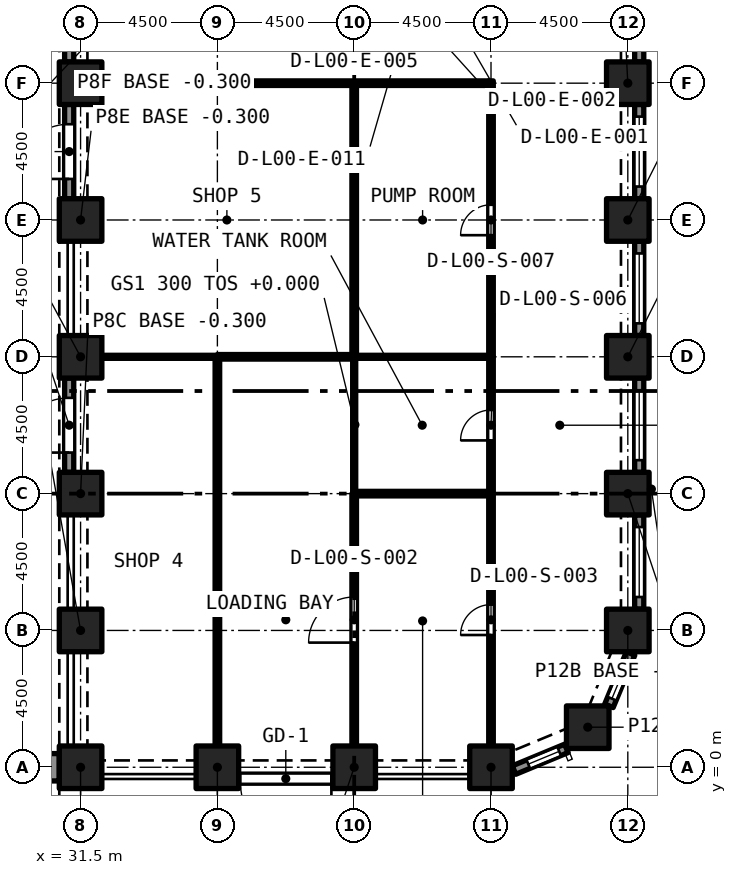
"""IFC4 building model, lengths in metres.
Left out: names, types, materials, properties, quantities, classifications, styles, units other than length and angle.
Written with IfcOpenShell. Run it as: python <this file> out.ifc"""

import sys

from ifc_helpers import new_model, si_unit, direction, frame, frame_2d, origin, origin_2d, place, context, subcontext, project, spatial, rectangle, extrude, element, fill, save


model = new_model("IFC4")
c1 = context("Model", 3, precision=1e-05, world=origin(), true_north=direction((0.0, 1.0)))
c2 = subcontext(c1, "Body", "Model", "MODEL_VIEW")
j1 = project(units=[si_unit("LENGTHUNIT", "METRE"), si_unit("PLANEANGLEUNIT", "RADIAN")], contexts=[c1])
p1 = place(None, origin())
s1 = spatial("IfcSite", under=j1, at=p1, CompositionType="ELEMENT")
p2 = place(p1, origin())
s2 = spatial("IfcBuilding", under=s1, at=p2, CompositionType="ELEMENT")
p3 = place(p2, origin())
s3 = spatial("IfcBuildingStorey", under=s2, at=p3, CompositionType="ELEMENT", Elevation=0.0)
for number, where, z_axis, x_axis in (
    (1, (31.5, 0.0, -0.3), (0.0, 0.0, 1.0), (1.0, 0.0, 0.0)),
    (2, (36.0, 0.0, -0.3), (0.0, 0.0, 1.0), (1.0, 0.0, 0.0)),
    (3, (40.5, 0.0, -0.3), (0.0, 0.0, 1.0), (1.0, 0.0, 0.0)),
    (4, (45.0, 0.0, -0.3), (0.0, 0.0, 1.0), (1.0, 0.0, 0.0)),
    (5, (48.182, 1.318, -0.3), (0.0, 0.0, 1.0), (1.0, 0.0, 0.0)),
    (6, (31.5, 4.5, -0.3), (0.0, 0.0, 1.0), (1.0, 0.0, 0.0)),
    (7, (49.5, 4.5, -0.3), (0.0, 0.0, 1.0), (1.0, 0.0, 0.0)),
    (8, (31.5, 9.0, -0.3), (0.0, 0.0, 1.0), (1.0, 0.0, 0.0)),
    (9, (49.5, 9.0, -0.3), (0.0, 0.0, 1.0), (1.0, 0.0, 0.0)),
    (10, (31.5, 13.5, -0.3), (0.0, 0.0, 1.0), (1.0, 0.0, 0.0)),
    (11, (49.5, 13.5, -0.3), (0.0, 0.0, 1.0), (1.0, 0.0, 0.0)),
    (12, (31.5, 18.0, -0.3), (0.0, 0.0, 1.0), (1.0, 0.0, 0.0)),
    (13, (49.5, 18.0, -0.3), (0.0, 0.0, 1.0), (1.0, 0.0, 0.0)),
    (14, (31.5, 22.5, -0.3), (0.0, 0.0, 1.0), (1.0, 0.0, 0.0)),
    (15, (49.5, 22.5, -0.3), (0.0, 0.0, 1.0), (1.0, 0.0, 0.0)),
):
    element("IfcColumn", number, at=place(p3, frame(where, z_axis=z_axis, x_axis=x_axis)), inside=s3, PredefinedType="COLUMN", context=c2, shape_type="SweptSolid", body=[
        extrude(rectangle(XDim=1.4, YDim=1.4, at=origin_2d()), origin(), (0.0, 0.0, 1.0), 6.3),
    ])
p4 = place(p3, frame((39.8, -0.375, 0.0), z_axis=(0.0, 0.0, 1.0), x_axis=(-1.0, 0.0, 0.0)))
e16 = element("IfcWall", 16, at=p4, inside=s3, PredefinedType="SOLIDWALL", context=c2, shape_type="SweptSolid", body=[
    extrude(rectangle(XDim=3.1, YDim=0.3, at=frame_2d((1.55, 0.0))), origin(), (0.0, 0.0, 1.0), 6.0),
])
p5 = place(p4, frame((0.05, 0.0, 0.0)))
e17 = element("IfcOpeningElement", 17, at=p5, cuts=e16, PredefinedType="OPENING", context=c2, shape_type="SweptSolid", body=[
    extrude(rectangle(XDim=3.0, YDim=3.6, at=frame_2d((1.5, 1.8))), frame((0.0, 0.16, 0.0), z_axis=(0.0, -1.0, 0.0), x_axis=(1.0, 0.0, 0.0)), (0.0, 0.0, 1.0), 0.32),
])
p6 = place(p3, frame((47.48, 0.622, 0.0), z_axis=(0.0, 0.0, 1.0), x_axis=(-0.923903565336, -0.38262540684, 0.0)))
e18 = element("IfcWall", 18, at=p6, inside=s3, PredefinedType="SOLIDWALL", context=c2, shape_type="SweptSolid", body=[
    extrude(rectangle(XDim=1.865, YDim=0.3, at=frame_2d((0.933, 0.0))), origin(), (0.0, 0.0, 1.0), 6.0),
])
p7 = place(p6, frame((0.258, 0.0, 0.45)))
e19 = element("IfcOpeningElement", 19, at=p7, cuts=e18, PredefinedType="OPENING", context=c2, shape_type="SweptSolid", body=[
    extrude(rectangle(XDim=1.1, YDim=3.3, at=frame_2d((0.55, 1.65))), frame((0.0, 0.16, 0.0), z_axis=(0.0, -1.0, 0.0), x_axis=(1.0, 0.0, 0.0)), (0.0, 0.0, 1.0), 0.32),
])
p8 = place(p3, frame((49.592, 3.743, 0.0), z_axis=(0.0, 0.0, 1.0), x_axis=(-0.382737135771, -0.923857286003, 0.0)))
e20 = element("IfcWall", 20, at=p8, inside=s3, PredefinedType="SOLIDWALL", context=c2, shape_type="SweptSolid", body=[
    extrude(rectangle(XDim=1.865, YDim=0.3, at=frame_2d((0.933, 0.0))), origin(), (0.0, 0.0, 1.0), 6.0),
])
p9 = place(p8, frame((0.508, 0.0, 0.45)))
e21 = element("IfcOpeningElement", 21, at=p9, cuts=e20, PredefinedType="OPENING", context=c2, shape_type="SweptSolid", body=[
    extrude(rectangle(XDim=1.1, YDim=3.3, at=frame_2d((0.55, 1.65))), frame((0.0, 0.16, 0.0), z_axis=(0.0, -1.0, 0.0), x_axis=(1.0, 0.0, 0.0)), (0.0, 0.0, 1.0), 0.32),
])
p10 = place(p3, frame((49.875, 8.3, 0.0), z_axis=(0.0, 0.0, 1.0), x_axis=(0.0, -1.0, 0.0)))
e22 = element("IfcWall", 22, at=p10, inside=s3, PredefinedType="SOLIDWALL", context=c2, shape_type="SweptSolid", body=[
    extrude(rectangle(XDim=3.1, YDim=0.3, at=frame_2d((1.55, 0.0))), origin(), (0.0, 0.0, 1.0), 6.0),
])
p11 = place(p10, frame((0.4, 0.0, 0.45)))
e23 = element("IfcOpeningElement", 23, at=p11, cuts=e22, PredefinedType="OPENING", context=c2, shape_type="SweptSolid", body=[
    extrude(rectangle(XDim=2.3, YDim=3.3, at=frame_2d((1.15, 1.65))), frame((0.0, 0.16, 0.0), z_axis=(0.0, -1.0, 0.0), x_axis=(1.0, 0.0, 0.0)), (0.0, 0.0, 1.0), 0.32),
])
p12 = place(p3, frame((49.875, 12.8, 0.0), z_axis=(0.0, 0.0, 1.0), x_axis=(0.0, -1.0, 0.0)))
e24 = element("IfcWall", 24, at=p12, inside=s3, PredefinedType="SOLIDWALL", context=c2, shape_type="SweptSolid", body=[
    extrude(rectangle(XDim=3.1, YDim=0.3, at=frame_2d((1.55, 0.0))), origin(), (0.0, 0.0, 1.0), 6.0),
])
p13 = place(p12, frame((0.4, 0.0, 0.45)))
e25 = element("IfcOpeningElement", 25, at=p13, cuts=e24, PredefinedType="OPENING", context=c2, shape_type="SweptSolid", body=[
    extrude(rectangle(XDim=2.3, YDim=3.3, at=frame_2d((1.15, 1.65))), frame((0.0, 0.16, 0.0), z_axis=(0.0, -1.0, 0.0), x_axis=(1.0, 0.0, 0.0)), (0.0, 0.0, 1.0), 0.32),
])
p14 = place(p3, frame((49.875, 17.3, 0.0), z_axis=(0.0, 0.0, 1.0), x_axis=(0.0, -1.0, 0.0)))
e26 = element("IfcWall", 26, at=p14, inside=s3, PredefinedType="SOLIDWALL", context=c2, shape_type="SweptSolid", body=[
    extrude(rectangle(XDim=3.1, YDim=0.3, at=frame_2d((1.55, 0.0))), origin(), (0.0, 0.0, 1.0), 6.0),
])
p15 = place(p14, frame((0.4, 0.0, 0.45)))
e27 = element("IfcOpeningElement", 27, at=p15, cuts=e26, PredefinedType="OPENING", context=c2, shape_type="SweptSolid", body=[
    extrude(rectangle(XDim=2.3, YDim=3.3, at=frame_2d((1.15, 1.65))), frame((0.0, 0.16, 0.0), z_axis=(0.0, -1.0, 0.0), x_axis=(1.0, 0.0, 0.0)), (0.0, 0.0, 1.0), 0.32),
])
p16 = place(p3, frame((49.875, 21.8, 0.0), z_axis=(0.0, 0.0, 1.0), x_axis=(0.0, -1.0, 0.0)))
e28 = element("IfcWall", 28, at=p16, inside=s3, PredefinedType="SOLIDWALL", context=c2, shape_type="SweptSolid", body=[
    extrude(rectangle(XDim=3.1, YDim=0.3, at=frame_2d((1.55, 0.0))), origin(), (0.0, 0.0, 1.0), 6.0),
])
p17 = place(p16, frame((0.4, 0.0, 0.45)))
e29 = element("IfcOpeningElement", 29, at=p17, cuts=e28, PredefinedType="OPENING", context=c2, shape_type="SweptSolid", body=[
    extrude(rectangle(XDim=2.3, YDim=3.3, at=frame_2d((1.15, 1.65))), frame((0.0, 0.16, 0.0), z_axis=(0.0, -1.0, 0.0), x_axis=(1.0, 0.0, 0.0)), (0.0, 0.0, 1.0), 0.32),
])
p18 = place(p3, frame((49.875, 26.3, 0.0), z_axis=(0.0, 0.0, 1.0), x_axis=(0.0, -1.0, 0.0)))
e30 = element("IfcWall", 30, at=p18, inside=s3, PredefinedType="SOLIDWALL", context=c2, shape_type="SweptSolid", body=[
    extrude(rectangle(XDim=3.1, YDim=0.3, at=frame_2d((1.55, 0.0))), origin(), (0.0, 0.0, 1.0), 6.0),
])
p19 = place(p18, frame((0.4, 0.0, 0.45)))
e31 = element("IfcOpeningElement", 31, at=p19, cuts=e30, PredefinedType="OPENING", context=c2, shape_type="SweptSolid", body=[
    extrude(rectangle(XDim=2.3, YDim=3.3, at=frame_2d((1.15, 1.65))), frame((0.0, 0.16, 0.0), z_axis=(0.0, -1.0, 0.0), x_axis=(1.0, 0.0, 0.0)), (0.0, 0.0, 1.0), 0.32),
])
p20 = place(p3, frame((31.125, 23.2, 0.0), z_axis=(0.0, 0.0, 1.0), x_axis=(0.0, 1.0, 0.0)))
e32 = element("IfcWall", 32, at=p20, inside=s3, PredefinedType="SOLIDWALL", context=c2, shape_type="SweptSolid", body=[
    extrude(rectangle(XDim=3.1, YDim=0.3, at=frame_2d((1.55, 0.0))), origin(), (0.0, 0.0, 1.0), 6.0),
])
p21 = place(p20, frame((0.95, 0.0, 0.0)))
e33 = element("IfcOpeningElement", 33, at=p21, cuts=e32, PredefinedType="OPENING", context=c2, shape_type="SweptSolid", body=[
    extrude(rectangle(XDim=1.2, YDim=2.4, at=frame_2d((0.6, 1.2))), frame((0.0, 0.16, 0.0), z_axis=(0.0, -1.0, 0.0), x_axis=(1.0, 0.0, 0.0)), (0.0, 0.0, 1.0), 0.32),
])
p22 = place(p3, frame((31.125, 18.7, 0.0), z_axis=(0.0, 0.0, 1.0), x_axis=(0.0, 1.0, 0.0)))
e34 = element("IfcWall", 34, at=p22, inside=s3, PredefinedType="SOLIDWALL", context=c2, shape_type="SweptSolid", body=[
    extrude(rectangle(XDim=3.1, YDim=0.3, at=frame_2d((1.55, 0.0))), origin(), (0.0, 0.0, 1.0), 6.0),
])
p23 = place(p22, frame((0.65, 0.0, 0.0)))
e35 = element("IfcOpeningElement", 35, at=p23, cuts=e34, PredefinedType="OPENING", context=c2, shape_type="SweptSolid", body=[
    extrude(rectangle(XDim=1.8, YDim=2.4, at=frame_2d((0.9, 1.2))), frame((0.0, 0.16, 0.0), z_axis=(0.0, -1.0, 0.0), x_axis=(1.0, 0.0, 0.0)), (0.0, 0.0, 1.0), 0.32),
])
p24 = place(p3, frame((31.125, 9.7, 0.0), z_axis=(0.0, 0.0, 1.0), x_axis=(0.0, 1.0, 0.0)))
e36 = element("IfcWall", 36, at=p24, inside=s3, PredefinedType="SOLIDWALL", context=c2, shape_type="SweptSolid", body=[
    extrude(rectangle(XDim=3.1, YDim=0.3, at=frame_2d((1.55, 0.0))), origin(), (0.0, 0.0, 1.0), 6.0),
])
p25 = place(p24, frame((0.65, 0.0, 0.0)))
e37 = element("IfcOpeningElement", 37, at=p25, cuts=e36, PredefinedType="OPENING", context=c2, shape_type="SweptSolid", body=[
    extrude(rectangle(XDim=1.8, YDim=2.4, at=frame_2d((0.9, 1.2))), frame((0.0, 0.16, 0.0), z_axis=(0.0, -1.0, 0.0), x_axis=(1.0, 0.0, 0.0)), (0.0, 0.0, 1.0), 0.32),
])
p26 = place(p3, frame((28.55, 0.0, 0.0), z_axis=(0.0, 0.0, 1.0), x_axis=(1.0, 0.0, 0.0)))
e38 = element("IfcWall", 38, at=p26, inside=s3, PredefinedType="SOLIDWALL", context=c2, shape_type="SweptSolid", body=[
    extrude(rectangle(XDim=2.25, YDim=0.9, at=frame_2d((1.125, 0.0))), origin(), (0.0, 0.0, 1.0), 10.5),
])
p27 = place(p3, frame((53.85, 9.15, 0.0), z_axis=(0.0, 0.0, 1.0), x_axis=(-1.0, 0.0, 0.0)))
e39 = element("IfcWall", 39, at=p27, inside=s3, PredefinedType="SOLIDWALL", context=c2, shape_type="SweptSolid", body=[
    extrude(rectangle(XDim=3.5, YDim=0.3, at=frame_2d((1.75, 0.0))), origin(), (0.0, 0.0, 1.0), 5.7),
])
p28 = place(p27, frame((1.15, 0.0, 0.0)))
e40 = element("IfcOpeningElement", 40, at=p28, cuts=e39, PredefinedType="OPENING", context=c2, shape_type="SweptSolid", body=[
    extrude(rectangle(XDim=1.0, YDim=2.1, at=frame_2d((0.5, 1.05))), frame((0.0, 0.16, 0.0), z_axis=(0.0, -1.0, 0.0), x_axis=(1.0, 0.0, 0.0)), (0.0, 0.0, 1.0), 0.32),
])
p29 = place(p3, frame((50.5, 9.3, 0.0), z_axis=(0.0, 0.0, 1.0), x_axis=(0.0, 1.0, 0.0)))
e41 = element("IfcWall", 41, at=p29, inside=s3, PredefinedType="SOLIDWALL", context=c2, shape_type="SweptSolid", body=[
    extrude(rectangle(XDim=35.4, YDim=0.3, at=frame_2d((17.7, 0.0))), origin(), (0.0, 0.0, 1.0), 5.7),
])
p30 = place(p3, frame((40.5, 0.7, 0.0), z_axis=(0.0, 0.0, 1.0), x_axis=(0.0, 1.0, 0.0)))
e42 = element("IfcWall", 42, at=p30, inside=s3, PredefinedType="PARTITIONING", context=c2, shape_type="SweptSolid", body=[
    extrude(rectangle(XDim=8.3, YDim=0.15, at=frame_2d((4.15, 0.0))), origin(), (0.0, 0.0, 1.0), 5.65),
])
p31 = place(p30, frame((3.4, 0.0, 0.0)))
e43 = element("IfcOpeningElement", 43, at=p31, cuts=e42, PredefinedType="OPENING", context=c2, shape_type="SweptSolid", body=[
    extrude(rectangle(XDim=1.5, YDim=2.4, at=frame_2d((0.75, 1.2))), frame((0.0, 0.085, 0.0), z_axis=(0.0, -1.0, 0.0), x_axis=(1.0, 0.0, 0.0)), (0.0, 0.0, 1.0), 0.17),
])
p32 = place(p3, frame((40.575, 9.0, 0.0), z_axis=(0.0, 0.0, 1.0), x_axis=(1.0, 0.0, 0.0)))
e44 = element("IfcWall", 44, at=p32, inside=s3, PredefinedType="PARTITIONING", context=c2, shape_type="SweptSolid", body=[
    extrude(rectangle(XDim=4.35, YDim=0.15, at=frame_2d((2.175, 0.0))), origin(), (0.0, 0.0, 1.0), 5.65),
])
p33 = place(p3, frame((45.0, 0.7, 0.0), z_axis=(0.0, 0.0, 1.0), x_axis=(0.0, 1.0, 0.0)))
e45 = element("IfcWall", 45, at=p33, inside=s3, PredefinedType="PARTITIONING", context=c2, shape_type="SweptSolid", body=[
    extrude(rectangle(XDim=8.3, YDim=0.15, at=frame_2d((4.15, 0.0))), origin(), (0.0, 0.0, 1.0), 5.65),
])
p34 = place(p33, frame((3.65, 0.0, 0.0)))
e46 = element("IfcOpeningElement", 46, at=p34, cuts=e45, PredefinedType="OPENING", context=c2, shape_type="SweptSolid", body=[
    extrude(rectangle(XDim=1.0, YDim=2.1, at=frame_2d((0.5, 1.05))), frame((0.0, 0.085, 0.0), z_axis=(0.0, -1.0, 0.0), x_axis=(1.0, 0.0, 0.0)), (0.0, 0.0, 1.0), 0.17),
])
p35 = place(p3, frame((40.5, 9.0, 0.0), z_axis=(0.0, 0.0, 1.0), x_axis=(0.0, 1.0, 0.0)))
e47 = element("IfcWall", 47, at=p35, inside=s3, PredefinedType="PARTITIONING", context=c2, shape_type="SweptSolid", body=[
    extrude(rectangle(XDim=4.425, YDim=0.1, at=frame_2d((2.212, 0.0))), origin(), (0.0, 0.0, 1.0), 5.65),
])
p36 = place(p3, frame((36.0, 13.5, 0.0), z_axis=(0.0, 0.0, 1.0), x_axis=(1.0, 0.0, 0.0)))
e48 = element("IfcWall", 48, at=p36, inside=s3, PredefinedType="PARTITIONING", context=c2, shape_type="SweptSolid", body=[
    extrude(rectangle(XDim=4.5, YDim=0.15, at=frame_2d((2.25, 0.0))), origin(), (0.0, 0.0, 1.0), 5.65),
])
p37 = place(p3, frame((36.0, 0.7, 0.0), z_axis=(0.0, 0.0, 1.0), x_axis=(0.0, 1.0, 0.0)))
e49 = element("IfcWall", 49, at=p37, inside=s3, PredefinedType="PARTITIONING", context=c2, shape_type="SweptSolid", body=[
    extrude(rectangle(XDim=12.725, YDim=0.15, at=frame_2d((6.363, 0.0))), origin(), (0.0, 0.0, 1.0), 5.65),
])
p38 = place(p3, frame((40.5, 13.5, 0.0), z_axis=(0.0, 0.0, 1.0), x_axis=(1.0, 0.0, 0.0)))
e50 = element("IfcWall", 50, at=p38, inside=s3, PredefinedType="PARTITIONING", context=c2, shape_type="SweptSolid", body=[
    extrude(rectangle(XDim=4.425, YDim=0.1, at=frame_2d((2.212, 0.0))), origin(), (0.0, 0.0, 1.0), 5.65),
])
p39 = place(p3, frame((45.0, 9.0, 0.0), z_axis=(0.0, 0.0, 1.0), x_axis=(0.0, 1.0, 0.0)))
e51 = element("IfcWall", 51, at=p39, inside=s3, PredefinedType="PARTITIONING", context=c2, shape_type="SweptSolid", body=[
    extrude(rectangle(XDim=4.5, YDim=0.15, at=frame_2d((2.25, 0.0))), origin(), (0.0, 0.0, 1.0), 5.65),
])
p40 = place(p39, frame((1.75, 0.0, 0.0)))
e52 = element("IfcOpeningElement", 52, at=p40, cuts=e51, PredefinedType="OPENING", context=c2, shape_type="SweptSolid", body=[
    extrude(rectangle(XDim=1.0, YDim=2.1, at=frame_2d((0.5, 1.05))), frame((0.0, 0.085, 0.0), z_axis=(0.0, -1.0, 0.0), x_axis=(1.0, 0.0, 0.0)), (0.0, 0.0, 1.0), 0.17),
])
p41 = place(p3, frame((45.0, 13.5, 0.0), z_axis=(0.0, 0.0, 1.0), x_axis=(0.0, 1.0, 0.0)))
e53 = element("IfcWall", 53, at=p41, inside=s3, PredefinedType="PARTITIONING", context=c2, shape_type="SweptSolid", body=[
    extrude(rectangle(XDim=9.075, YDim=0.15, at=frame_2d((4.538, 0.0))), origin(), (0.0, 0.0, 1.0), 5.65),
])
p42 = place(p41, frame((4.0, 0.0, 0.0)))
e54 = element("IfcOpeningElement", 54, at=p42, cuts=e53, PredefinedType="OPENING", context=c2, shape_type="SweptSolid", body=[
    extrude(rectangle(XDim=1.0, YDim=2.1, at=frame_2d((0.5, 1.05))), frame((0.0, 0.085, 0.0), z_axis=(0.0, -1.0, 0.0), x_axis=(1.0, 0.0, 0.0)), (0.0, 0.0, 1.0), 0.17),
])
p43 = place(p3, frame((40.5, 13.575, 0.0), z_axis=(0.0, 0.0, 1.0), x_axis=(0.0, 1.0, 0.0)))
e55 = element("IfcWall", 55, at=p43, inside=s3, PredefinedType="PARTITIONING", context=c2, shape_type="SweptSolid", body=[
    extrude(rectangle(XDim=8.85, YDim=0.15, at=frame_2d((4.425, 0.0))), origin(), (0.0, 0.0, 1.0), 5.65),
])
p44 = place(p3, frame((32.2, 13.5, 0.0), z_axis=(0.0, 0.0, 1.0), x_axis=(1.0, 0.0, 0.0)))
e56 = element("IfcWall", 56, at=p44, inside=s3, PredefinedType="PARTITIONING", context=c2, shape_type="SweptSolid", body=[
    extrude(rectangle(XDim=3.8, YDim=0.1, at=frame_2d((1.9, 0.0))), origin(), (0.0, 0.0, 1.0), 5.65),
])
p45 = place(p3, frame((32.2, 22.5, 0.0), z_axis=(0.0, 0.0, 1.0), x_axis=(1.0, 0.0, 0.0)))
e57 = element("IfcWall", 57, at=p45, inside=s3, PredefinedType="PARTITIONING", context=c2, shape_type="SweptSolid", body=[
    extrude(rectangle(XDim=12.725, YDim=0.15, at=frame_2d((6.363, 0.0))), origin(), (0.0, 0.0, 1.0), 5.65),
])
p46 = place(p7, origin())
e58 = element("IfcWindow", 58, at=p46, inside=s3, PartitioningType="SINGLE_PANEL", PredefinedType="WINDOW", context=c2, shape_type="SweptSolid", body=[
    extrude(rectangle(XDim=1.1, YDim=3.3, at=frame_2d((0.55, 1.65))), frame((0.0, 0.03, 0.0), z_axis=(0.0, -1.0, 0.0), x_axis=(1.0, 0.0, 0.0)), (0.0, 0.0, 1.0), 0.06),
])
fill(e19, e58)
p47 = place(p9, origin())
e59 = element("IfcWindow", 59, at=p47, inside=s3, PartitioningType="SINGLE_PANEL", PredefinedType="WINDOW", context=c2, shape_type="SweptSolid", body=[
    extrude(rectangle(XDim=1.1, YDim=3.3, at=frame_2d((0.55, 1.65))), frame((0.0, 0.03, 0.0), z_axis=(0.0, -1.0, 0.0), x_axis=(1.0, 0.0, 0.0)), (0.0, 0.0, 1.0), 0.06),
])
fill(e21, e59)
p48 = place(p11, origin())
e60 = element("IfcWindow", 60, at=p48, inside=s3, PartitioningType="SINGLE_PANEL", PredefinedType="WINDOW", context=c2, shape_type="SweptSolid", body=[
    extrude(rectangle(XDim=2.3, YDim=3.3, at=frame_2d((1.15, 1.65))), frame((0.0, 0.03, 0.0), z_axis=(0.0, -1.0, 0.0), x_axis=(1.0, 0.0, 0.0)), (0.0, 0.0, 1.0), 0.06),
])
fill(e23, e60)
p49 = place(p13, origin())
e61 = element("IfcWindow", 61, at=p49, inside=s3, PartitioningType="SINGLE_PANEL", PredefinedType="WINDOW", context=c2, shape_type="SweptSolid", body=[
    extrude(rectangle(XDim=2.3, YDim=3.3, at=frame_2d((1.15, 1.65))), frame((0.0, 0.03, 0.0), z_axis=(0.0, -1.0, 0.0), x_axis=(1.0, 0.0, 0.0)), (0.0, 0.0, 1.0), 0.06),
])
fill(e25, e61)
p50 = place(p15, origin())
e62 = element("IfcWindow", 62, at=p50, inside=s3, PartitioningType="SINGLE_PANEL", PredefinedType="WINDOW", context=c2, shape_type="SweptSolid", body=[
    extrude(rectangle(XDim=2.3, YDim=3.3, at=frame_2d((1.15, 1.65))), frame((0.0, 0.03, 0.0), z_axis=(0.0, -1.0, 0.0), x_axis=(1.0, 0.0, 0.0)), (0.0, 0.0, 1.0), 0.06),
])
fill(e27, e62)
p51 = place(p17, origin())
e63 = element("IfcWindow", 63, at=p51, inside=s3, PartitioningType="SINGLE_PANEL", PredefinedType="WINDOW", context=c2, shape_type="SweptSolid", body=[
    extrude(rectangle(XDim=2.3, YDim=3.3, at=frame_2d((1.15, 1.65))), frame((0.0, 0.03, 0.0), z_axis=(0.0, -1.0, 0.0), x_axis=(1.0, 0.0, 0.0)), (0.0, 0.0, 1.0), 0.06),
])
fill(e29, e63)
p52 = place(p5, origin())
e64 = element("IfcDoor", 64, at=p52, inside=s3, OperationType="SINGLE_SWING_LEFT", PredefinedType="GATE", context=c2, shape_type="SweptSolid", body=[
    extrude(rectangle(XDim=3.0, YDim=3.6, at=frame_2d((1.5, 1.8))), frame((0.0, 0.025, 0.0), z_axis=(0.0, -1.0, 0.0), x_axis=(1.0, 0.0, 0.0)), (0.0, 0.0, 1.0), 0.05),
])
fill(e17, e64)
p53 = place(p23, origin())
e65 = element("IfcDoor", 65, at=p53, inside=s3, OperationType="SINGLE_SWING_LEFT", PredefinedType="DOOR", context=c2, shape_type="SweptSolid", body=[
    extrude(rectangle(XDim=1.8, YDim=2.4, at=frame_2d((0.9, 1.2))), frame((0.0, 0.025, 0.0), z_axis=(0.0, -1.0, 0.0), x_axis=(1.0, 0.0, 0.0)), (0.0, 0.0, 1.0), 0.05),
])
fill(e35, e65)
p54 = place(p25, origin())
e66 = element("IfcDoor", 66, at=p54, inside=s3, OperationType="SINGLE_SWING_LEFT", PredefinedType="DOOR", context=c2, shape_type="SweptSolid", body=[
    extrude(rectangle(XDim=1.8, YDim=2.4, at=frame_2d((0.9, 1.2))), frame((0.0, 0.025, 0.0), z_axis=(0.0, -1.0, 0.0), x_axis=(1.0, 0.0, 0.0)), (0.0, 0.0, 1.0), 0.05),
])
fill(e37, e66)
p55 = place(p31, origin())
e67 = element("IfcDoor", 67, at=p55, inside=s3, OperationType="DOUBLE_DOOR_SINGLE_SWING", PredefinedType="DOOR", context=c2, shape_type="SweptSolid", body=[
    extrude(rectangle(XDim=1.5, YDim=2.4, at=frame_2d((0.75, 1.2))), frame((0.0, 0.025, 0.0), z_axis=(0.0, -1.0, 0.0), x_axis=(1.0, 0.0, 0.0)), (0.0, 0.0, 1.0), 0.05),
])
fill(e43, e67)
p56 = place(p34, origin())
e68 = element("IfcDoor", 68, at=p56, inside=s3, OperationType="SINGLE_SWING_RIGHT", PredefinedType="DOOR", context=c2, shape_type="SweptSolid", body=[
    extrude(rectangle(XDim=1.0, YDim=2.1, at=frame_2d((0.5, 1.05))), frame((0.0, 0.025, 0.0), z_axis=(0.0, -1.0, 0.0), x_axis=(1.0, 0.0, 0.0)), (0.0, 0.0, 1.0), 0.05),
])
fill(e46, e68)
p57 = place(p40, origin())
e69 = element("IfcDoor", 69, at=p57, inside=s3, OperationType="SINGLE_SWING_RIGHT", PredefinedType="DOOR", context=c2, shape_type="SweptSolid", body=[
    extrude(rectangle(XDim=1.0, YDim=2.1, at=frame_2d((0.5, 1.05))), frame((0.0, 0.025, 0.0), z_axis=(0.0, -1.0, 0.0), x_axis=(1.0, 0.0, 0.0)), (0.0, 0.0, 1.0), 0.05),
])
fill(e52, e69)
p58 = place(p42, origin())
e70 = element("IfcDoor", 70, at=p58, inside=s3, OperationType="SINGLE_SWING_LEFT", PredefinedType="DOOR", context=c2, shape_type="SweptSolid", body=[
    extrude(rectangle(XDim=1.0, YDim=2.1, at=frame_2d((0.5, 1.05))), frame((0.0, 0.025, 0.0), z_axis=(0.0, -1.0, 0.0), x_axis=(1.0, 0.0, 0.0)), (0.0, 0.0, 1.0), 0.05),
])
fill(e54, e70)
save(model, sys.argv[1])
